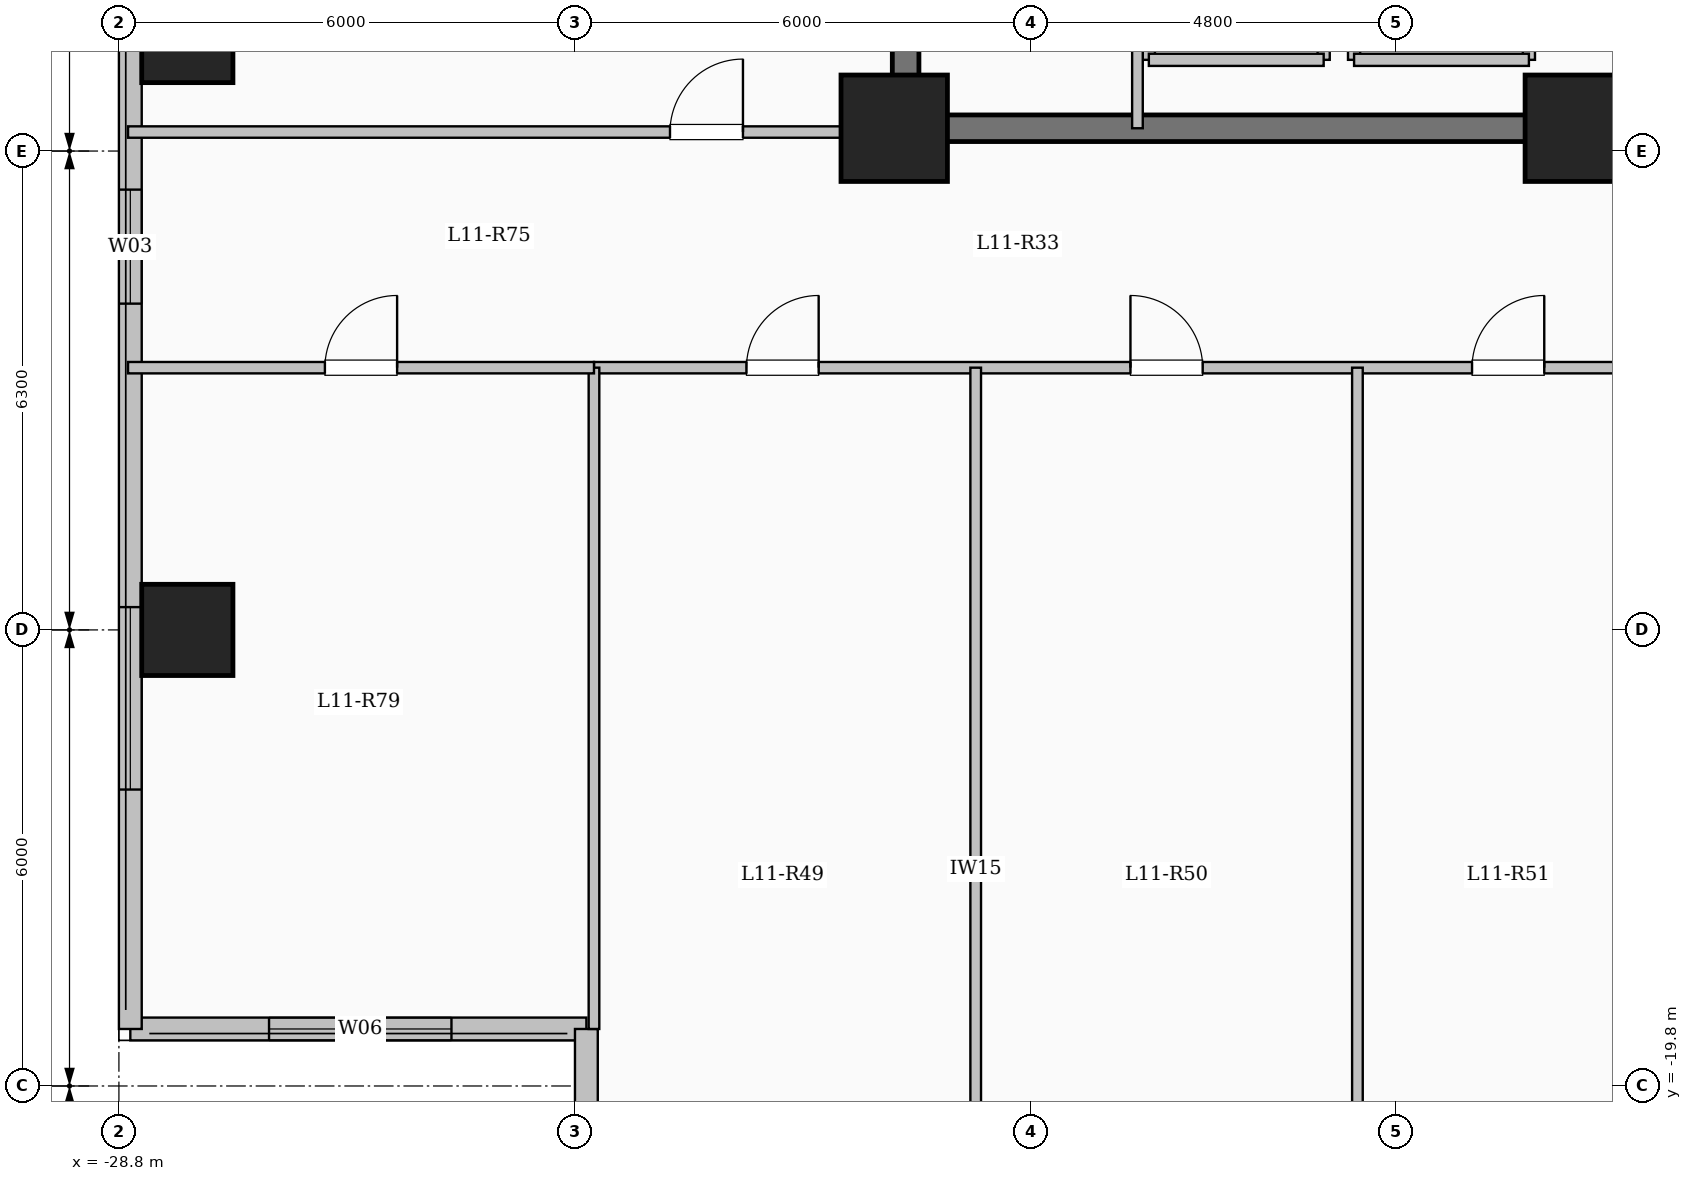
"""IFC4 building model, lengths in metres.
Left out: names, types, materials, properties, quantities, classifications, styles, units other than length and angle.
Written with IfcOpenShell. Run it as: python <this file> out.ifc"""

import sys

from ifc_helpers import new_model, si_unit, direction, frame, frame_2d, origin, origin_2d, place, context, subcontext, project, spatial, rectangle, extrude, element, fill, save


model = new_model("IFC4")
c1 = context("Model", 3, precision=1e-05, world=origin(), true_north=direction((0.0, 1.0)))
c2 = subcontext(c1, "Body", "Model", "MODEL_VIEW")
j1 = project(units=[si_unit("LENGTHUNIT", "METRE"), si_unit("PLANEANGLEUNIT", "RADIAN")], contexts=[c1])
p1 = place(None, origin())
s1 = spatial("IfcSite", under=j1, at=p1, CompositionType="ELEMENT")
p2 = place(p1, origin())
s2 = spatial("IfcBuilding", under=s1, at=p2, CompositionType="ELEMENT")
p3 = place(p2, frame((0.0, 0.0, 44.1)))
s3 = spatial("IfcBuildingStorey", under=s2, at=p3, CompositionType="ELEMENT", Elevation=44.1)
for number, where, z_axis, x_axis in (
    (1, (-9.6, -7.2, 0.0), (0.0, 0.0, 1.0), (1.0, 0.0, 0.0)),
    (2, (-18.6, -7.2, 0.0), (0.0, 0.0, 1.0), (1.0, 0.0, 0.0)),
):
    element("IfcColumn", number, at=place(p3, frame(where, z_axis=z_axis, x_axis=x_axis)), inside=s3, PredefinedType="COLUMN", context=c2, shape_type="SweptSolid", body=[
        extrude(rectangle(XDim=1.4, YDim=1.4, at=origin_2d()), origin(), (0.0, 0.0, 1.0), 3.35),
    ])
for number, where, z_axis, x_axis in (
    (3, (-27.9, -13.8, 0.0), (0.0, 0.0, 1.0), (1.0, 0.0, 0.0)),
    (4, (-27.9, -6.0, 0.0), (0.0, 0.0, 1.0), (1.0, 0.0, 0.0)),
):
    element("IfcColumn", number, at=place(p3, frame(where, z_axis=z_axis, x_axis=x_axis)), inside=s3, PredefinedType="COLUMN", context=c2, shape_type="SweptSolid", body=[
        extrude(rectangle(XDim=1.2, YDim=1.2, at=origin_2d()), origin(), (0.0, 0.0, 1.0), 3.35),
    ])
p4 = place(p3, frame((-22.65, -19.05, 0.0), z_axis=(0.0, 0.0, 1.0), x_axis=(-1.0, 0.0, 0.0)))
e5 = element("IfcWall", 5, at=p4, inside=s3, PredefinedType="SOLIDWALL", context=c2, shape_type="SweptSolid", body=[
    extrude(rectangle(XDim=6.0, YDim=0.3, at=frame_2d((3.0, 0.0))), origin(), (0.0, 0.0, 1.0), 3.1),
])
p5 = place(p4, frame((1.775, 0.0, 0.9)))
e6 = element("IfcOpeningElement", 6, at=p5, cuts=e5, PredefinedType="OPENING", context=c2, shape_type="SweptSolid", body=[
    extrude(rectangle(XDim=2.4, YDim=1.8, at=frame_2d((1.2, 0.9))), frame((0.0, 0.16, 0.0), z_axis=(0.0, -1.0, 0.0), x_axis=(1.0, 0.0, 0.0)), (0.0, 0.0, 1.0), 0.32),
])
p6 = place(p3, frame((-28.65, -19.05, 0.0), z_axis=(0.0, 0.0, 1.0), x_axis=(0.0, 1.0, 0.0)))
e7 = element("IfcWall", 7, at=p6, inside=s3, PredefinedType="SOLIDWALL", context=c2, shape_type="SweptSolid", body=[
    extrude(rectangle(XDim=38.1, YDim=0.3, at=frame_2d((19.05, 0.0))), origin(), (0.0, 0.0, 1.0), 3.1),
])
p7 = place(p6, frame((3.15, 0.0, 0.9)))
e8 = element("IfcOpeningElement", 8, at=p7, cuts=e7, PredefinedType="OPENING", context=c2, shape_type="SweptSolid", body=[
    extrude(rectangle(XDim=2.4, YDim=1.8, at=frame_2d((1.2, 0.9))), frame((0.0, 0.16, 0.0), z_axis=(0.0, -1.0, 0.0), x_axis=(1.0, 0.0, 0.0)), (0.0, 0.0, 1.0), 0.32),
])
p8 = place(p6, frame((9.542, 0.0, 0.9)))
e9 = element("IfcOpeningElement", 9, at=p8, cuts=e7, PredefinedType="OPENING", context=c2, shape_type="SweptSolid", body=[
    extrude(rectangle(XDim=1.5, YDim=1.65, at=frame_2d((0.75, 0.825))), frame((0.0, 0.16, 0.0), z_axis=(0.0, -1.0, 0.0), x_axis=(1.0, 0.0, 0.0)), (0.0, 0.0, 1.0), 0.32),
])
p9 = place(p6, frame((14.95, 0.0, 0.9)))
e10 = element("IfcOpeningElement", 10, at=p9, cuts=e7, PredefinedType="OPENING", context=c2, shape_type="SweptSolid", body=[
    extrude(rectangle(XDim=2.4, YDim=1.8, at=frame_2d((1.2, 0.9))), frame((0.0, 0.16, 0.0), z_axis=(0.0, -1.0, 0.0), x_axis=(1.0, 0.0, 0.0)), (0.0, 0.0, 1.0), 0.32),
])
p10 = place(p6, frame((21.375, 0.0, 0.9)))
e11 = element("IfcOpeningElement", 11, at=p10, cuts=e7, PredefinedType="OPENING", context=c2, shape_type="SweptSolid", body=[
    extrude(rectangle(XDim=1.8, YDim=1.65, at=frame_2d((0.9, 0.825))), frame((0.0, 0.16, 0.0), z_axis=(0.0, -1.0, 0.0), x_axis=(1.0, 0.0, 0.0)), (0.0, 0.0, 1.0), 0.32),
])
p11 = place(p6, frame((25.925, 0.0, 0.9)))
e12 = element("IfcOpeningElement", 12, at=p11, cuts=e7, PredefinedType="OPENING", context=c2, shape_type="SweptSolid", body=[
    extrude(rectangle(XDim=2.0, YDim=1.7, at=frame_2d((1.0, 0.85))), frame((0.0, 0.16, 0.0), z_axis=(0.0, -1.0, 0.0), x_axis=(1.0, 0.0, 0.0)), (0.0, 0.0, 1.0), 0.32),
])
p12 = place(p6, frame((30.175, 0.0, 0.95)))
e13 = element("IfcOpeningElement", 13, at=p12, cuts=e7, PredefinedType="OPENING", context=c2, shape_type="SweptSolid", body=[
    extrude(rectangle(XDim=1.0, YDim=1.5, at=frame_2d((0.5, 0.75))), frame((0.0, 0.16, 0.0), z_axis=(0.0, -1.0, 0.0), x_axis=(1.0, 0.0, 0.0)), (0.0, 0.0, 1.0), 0.32),
])
p13 = place(p6, frame((33.85, 0.0, 0.9)))
e14 = element("IfcOpeningElement", 14, at=p13, cuts=e7, PredefinedType="OPENING", context=c2, shape_type="SweptSolid", body=[
    extrude(rectangle(XDim=2.0, YDim=1.7, at=frame_2d((1.0, 0.85))), frame((0.0, 0.16, 0.0), z_axis=(0.0, -1.0, 0.0), x_axis=(1.0, 0.0, 0.0)), (0.0, 0.0, 1.0), 0.32),
])
p14 = place(p3, frame((-22.65, -23.55, 0.0), z_axis=(0.0, 0.0, 1.0), x_axis=(0.0, 1.0, 0.0)))
e15 = element("IfcWall", 15, at=p14, inside=s3, PredefinedType="SOLIDWALL", context=c2, shape_type="SweptSolid", body=[
    extrude(rectangle(XDim=4.5, YDim=0.3, at=frame_2d((2.25, 0.0))), origin(), (0.0, 0.0, 1.0), 3.1),
])
p15 = place(p14, frame((1.268, 0.0, 0.9)))
e16 = element("IfcOpeningElement", 16, at=p15, cuts=e15, PredefinedType="OPENING", context=c2, shape_type="SweptSolid", body=[
    extrude(rectangle(XDim=2.0, YDim=1.7, at=frame_2d((1.0, 0.85))), frame((0.0, 0.16, 0.0), z_axis=(0.0, -1.0, 0.0), x_axis=(1.0, 0.0, 0.0)), (0.0, 0.0, 1.0), 0.32),
])
p16 = place(p3, frame((-12.55, -6.3, 0.0), z_axis=(0.0, 0.0, 1.0), x_axis=(0.0, 1.0, 0.0)))
e17 = element("IfcWall", 17, at=p16, inside=s3, PredefinedType="SOLIDWALL", context=c2, shape_type="SweptSolid", body=[
    extrude(rectangle(XDim=2.6, YDim=0.16, at=frame_2d((1.3, 0.0))), origin(), (0.0, 0.0, 1.0), 3.1),
])
p17 = place(p3, frame((-10.25, -6.3, 0.0), z_axis=(0.0, 0.0, 1.0), x_axis=(0.0, 1.0, 0.0)))
e18 = element("IfcWall", 18, at=p17, inside=s3, PredefinedType="SOLIDWALL", context=c2, shape_type="SweptSolid", body=[
    extrude(rectangle(XDim=2.6, YDim=0.16, at=frame_2d((1.3, 0.0))), origin(), (0.0, 0.0, 1.0), 3.1),
])
p18 = place(p17, frame((0.75, 0.0, 0.0)))
e19 = element("IfcOpeningElement", 19, at=p18, cuts=e18, PredefinedType="OPENING", context=c2, shape_type="SweptSolid", body=[
    extrude(rectangle(XDim=1.1, YDim=2.15, at=frame_2d((0.55, 1.075))), frame((0.0, 0.09, 0.0), z_axis=(0.0, -1.0, 0.0), x_axis=(1.0, 0.0, 0.0)), (0.0, 0.0, 1.0), 0.18),
])
p19 = place(p3, frame((-12.55, -6.3, 0.0), z_axis=(0.0, 0.0, 1.0), x_axis=(1.0, 0.0, 0.0)))
e20 = element("IfcWall", 20, at=p19, inside=s3, PredefinedType="SOLIDWALL", context=c2, shape_type="SweptSolid", body=[
    extrude(rectangle(XDim=2.3, YDim=0.16, at=frame_2d((1.15, 0.0))), origin(), (0.0, 0.0, 1.0), 3.1),
])
for number, where, z_axis, x_axis in (
    (21, (-15.25, -6.3, 0.0), (0.0, 0.0, 1.0), (0.0, 1.0, 0.0)),
    (22, (-12.95, -6.3, 0.0), (0.0, 0.0, 1.0), (0.0, 1.0, 0.0)),
):
    element("IfcWall", number, at=place(p3, frame(where, z_axis=z_axis, x_axis=x_axis)), inside=s3, PredefinedType="SOLIDWALL", context=c2, shape_type="SweptSolid", body=[
        extrude(rectangle(XDim=2.6, YDim=0.16, at=frame_2d((1.3, 0.0))), origin(), (0.0, 0.0, 1.0), 3.1),
    ])
p20 = place(p3, frame((-15.25, -6.3, 0.0), z_axis=(0.0, 0.0, 1.0), x_axis=(1.0, 0.0, 0.0)))
e23 = element("IfcWall", 23, at=p20, inside=s3, PredefinedType="SOLIDWALL", context=c2, shape_type="SweptSolid", body=[
    extrude(rectangle(XDim=2.3, YDim=0.16, at=frame_2d((1.15, 0.0))), origin(), (0.0, 0.0, 1.0), 3.1),
])
p21 = place(p3, frame((-18.45, -7.375, 0.0), z_axis=(0.0, 0.0, 1.0), x_axis=(0.0, 1.0, 0.0)))
e24 = element("IfcWall", 24, at=p21, inside=s3, PredefinedType="SHEAR", context=c2, shape_type="SweptSolid", body=[
    extrude(rectangle(XDim=14.05, YDim=0.35, at=frame_2d((7.025, 0.0))), origin(), (0.0, 0.0, 1.0), 3.35),
])
p22 = place(p3, frame((-18.625, -7.2, 0.0), z_axis=(0.0, 0.0, 1.0), x_axis=(1.0, 0.0, 0.0)))
e25 = element("IfcWall", 25, at=p22, inside=s3, PredefinedType="SHEAR", context=c2, shape_type="SweptSolid", body=[
    extrude(rectangle(XDim=8.55, YDim=0.35, at=frame_2d((4.275, 0.0))), origin(), (0.0, 0.0, 1.0), 3.35),
])
p23 = place(p3, frame((-15.4, -7.2, 0.0), z_axis=(0.0, 0.0, 1.0), x_axis=(0.0, 1.0, 0.0)))
e26 = element("IfcWall", 26, at=p23, inside=s3, PredefinedType="PARTITIONING", context=c2, shape_type="SweptSolid", body=[
    extrude(rectangle(XDim=10.45, YDim=0.14, at=frame_2d((5.225, 0.0))), origin(), (0.0, 0.0, 1.0), 3.1),
])
p24 = place(p23, frame((9.25, 0.0, 0.0)))
e27 = element("IfcOpeningElement", 27, at=p24, cuts=e26, PredefinedType="OPENING", context=c2, shape_type="SweptSolid", body=[
    extrude(rectangle(XDim=0.9, YDim=2.08, at=frame_2d((0.45, 1.04))), frame((0.0, 0.08, 0.0), z_axis=(0.0, -1.0, 0.0), x_axis=(1.0, 0.0, 0.0)), (0.0, 0.0, 1.0), 0.16),
])
p25 = place(p3, frame((-22.55, -10.35, 0.0), z_axis=(0.0, 0.0, 1.0), x_axis=(1.0, 0.0, 0.0)))
e28 = element("IfcWall", 28, at=p25, inside=s3, PredefinedType="PARTITIONING", context=c2, shape_type="SweptSolid", body=[
    extrude(rectangle(XDim=14.0, YDim=0.15, at=frame_2d((7.0, 0.0))), origin(), (0.0, 0.0, 1.0), 3.1),
])
p26 = place(p25, frame((2.006, 0.0, 0.0)))
e29 = element("IfcOpeningElement", 29, at=p26, cuts=e28, PredefinedType="OPENING", context=c2, shape_type="SweptSolid", body=[
    extrude(rectangle(XDim=0.95, YDim=2.15, at=frame_2d((0.475, 1.075))), frame((0.0, 0.085, 0.0), z_axis=(0.0, -1.0, 0.0), x_axis=(1.0, 0.0, 0.0)), (0.0, 0.0, 1.0), 0.17),
])
p27 = place(p25, frame((7.058, 0.0, 0.0)))
e30 = element("IfcOpeningElement", 30, at=p27, cuts=e28, PredefinedType="OPENING", context=c2, shape_type="SweptSolid", body=[
    extrude(rectangle(XDim=0.95, YDim=2.15, at=frame_2d((0.475, 1.075))), frame((0.0, 0.085, 0.0), z_axis=(0.0, -1.0, 0.0), x_axis=(1.0, 0.0, 0.0)), (0.0, 0.0, 1.0), 0.17),
])
p28 = place(p25, frame((11.552, 0.0, 0.0)))
e31 = element("IfcOpeningElement", 31, at=p28, cuts=e28, PredefinedType="OPENING", context=c2, shape_type="SweptSolid", body=[
    extrude(rectangle(XDim=0.95, YDim=2.15, at=frame_2d((0.475, 1.075))), frame((0.0, 0.085, 0.0), z_axis=(0.0, -1.0, 0.0), x_axis=(1.0, 0.0, 0.0)), (0.0, 0.0, 1.0), 0.17),
])
for number, where, z_axis, x_axis in (
    (32, (-17.528, -23.55, 0.0), (0.0, 0.0, 1.0), (0.0, 1.0, 0.0)),
    (33, (-12.506, -23.55, 0.0), (0.0, 0.0, 1.0), (0.0, 1.0, 0.0)),
):
    element("IfcWall", number, at=place(p3, frame(where, z_axis=z_axis, x_axis=x_axis)), inside=s3, PredefinedType="PARTITIONING", context=c2, shape_type="SweptSolid", body=[
        extrude(rectangle(XDim=13.2, YDim=0.14, at=frame_2d((6.6, 0.0))), origin(), (0.0, 0.0, 1.0), 3.1),
    ])
p29 = place(p3, frame((-28.68, -7.25, 0.0), z_axis=(0.0, 0.0, 1.0), x_axis=(1.0, 0.0, 0.0)))
e34 = element("IfcWall", 34, at=p29, inside=s3, PredefinedType="PARTITIONING", context=c2, shape_type="SweptSolid", body=[
    extrude(rectangle(XDim=10.23, YDim=0.15, at=frame_2d((5.115, 0.0))), origin(), (0.0, 0.0, 1.0), 3.1),
])
p30 = place(p29, frame((7.13, 0.0, 0.0)))
e35 = element("IfcOpeningElement", 35, at=p30, cuts=e34, PredefinedType="OPENING", context=c2, shape_type="SweptSolid", body=[
    extrude(rectangle(XDim=0.96, YDim=2.15, at=frame_2d((0.48, 1.075))), frame((0.0, 0.085, 0.0), z_axis=(0.0, -1.0, 0.0), x_axis=(1.0, 0.0, 0.0)), (0.0, 0.0, 1.0), 0.17),
])
p31 = place(p3, frame((-22.55, -19.05, 0.0), z_axis=(0.0, 0.0, 1.0), x_axis=(0.0, 1.0, 0.0)))
e36 = element("IfcWall", 36, at=p31, inside=s3, PredefinedType="PARTITIONING", context=c2, shape_type="SweptSolid", body=[
    extrude(rectangle(XDim=8.7, YDim=0.14, at=frame_2d((4.35, 0.0))), origin(), (0.0, 0.0, 1.0), 3.1),
])
p32 = place(p3, frame((-28.68, -10.35, 0.0), z_axis=(0.0, 0.0, 1.0), x_axis=(1.0, 0.0, 0.0)))
e37 = element("IfcWall", 37, at=p32, inside=s3, PredefinedType="PARTITIONING", context=c2, shape_type="SweptSolid", body=[
    extrude(rectangle(XDim=6.13, YDim=0.15, at=frame_2d((3.065, 0.0))), origin(), (0.0, 0.0, 1.0), 3.1),
])
p33 = place(p32, frame((2.59, 0.0, 0.0)))
e38 = element("IfcOpeningElement", 38, at=p33, cuts=e37, PredefinedType="OPENING", context=c2, shape_type="SweptSolid", body=[
    extrude(rectangle(XDim=0.95, YDim=2.15, at=frame_2d((0.475, 1.075))), frame((0.0, 0.085, 0.0), z_axis=(0.0, -1.0, 0.0), x_axis=(1.0, 0.0, 0.0)), (0.0, 0.0, 1.0), 0.17),
])
p34 = place(p5, origin())
e39 = element("IfcWindow", 39, at=p34, inside=s3, PartitioningType="SINGLE_PANEL", PredefinedType="WINDOW", context=c2, shape_type="SweptSolid", body=[
    extrude(rectangle(XDim=2.4, YDim=1.8, at=frame_2d((1.2, 0.9))), frame((0.0, 0.03, 0.0), z_axis=(0.0, -1.0, 0.0), x_axis=(1.0, 0.0, 0.0)), (0.0, 0.0, 1.0), 0.06),
])
fill(e6, e39)
p35 = place(p7, origin())
e40 = element("IfcWindow", 40, at=p35, inside=s3, PartitioningType="SINGLE_PANEL", PredefinedType="WINDOW", context=c2, shape_type="SweptSolid", body=[
    extrude(rectangle(XDim=2.4, YDim=1.8, at=frame_2d((1.2, 0.9))), frame((0.0, 0.03, 0.0), z_axis=(0.0, -1.0, 0.0), x_axis=(1.0, 0.0, 0.0)), (0.0, 0.0, 1.0), 0.06),
])
fill(e8, e40)
p36 = place(p8, origin())
e41 = element("IfcWindow", 41, at=p36, inside=s3, PartitioningType="SINGLE_PANEL", PredefinedType="WINDOW", context=c2, shape_type="SweptSolid", body=[
    extrude(rectangle(XDim=1.5, YDim=1.65, at=frame_2d((0.75, 0.825))), frame((0.0, 0.03, 0.0), z_axis=(0.0, -1.0, 0.0), x_axis=(1.0, 0.0, 0.0)), (0.0, 0.0, 1.0), 0.06),
])
fill(e9, e41)
p37 = place(p26, origin())
e42 = element("IfcDoor", 42, at=p37, inside=s3, OperationType="SINGLE_SWING_RIGHT", PredefinedType="DOOR", context=c2, shape_type="SweptSolid", body=[
    extrude(rectangle(XDim=0.95, YDim=2.15, at=frame_2d((0.475, 1.075))), frame((0.0, 0.025, 0.0), z_axis=(0.0, -1.0, 0.0), x_axis=(1.0, 0.0, 0.0)), (0.0, 0.0, 1.0), 0.05),
])
fill(e29, e42)
p38 = place(p27, origin())
e43 = element("IfcDoor", 43, at=p38, inside=s3, OperationType="SINGLE_SWING_LEFT", PredefinedType="DOOR", context=c2, shape_type="SweptSolid", body=[
    extrude(rectangle(XDim=0.95, YDim=2.15, at=frame_2d((0.475, 1.075))), frame((0.0, 0.025, 0.0), z_axis=(0.0, -1.0, 0.0), x_axis=(1.0, 0.0, 0.0)), (0.0, 0.0, 1.0), 0.05),
])
fill(e30, e43)
p39 = place(p28, origin())
e44 = element("IfcDoor", 44, at=p39, inside=s3, OperationType="SINGLE_SWING_RIGHT", PredefinedType="DOOR", context=c2, shape_type="SweptSolid", body=[
    extrude(rectangle(XDim=0.95, YDim=2.15, at=frame_2d((0.475, 1.075))), frame((0.0, 0.025, 0.0), z_axis=(0.0, -1.0, 0.0), x_axis=(1.0, 0.0, 0.0)), (0.0, 0.0, 1.0), 0.05),
])
fill(e31, e44)
p40 = place(p33, origin())
e45 = element("IfcDoor", 45, at=p40, inside=s3, OperationType="SINGLE_SWING_RIGHT", PredefinedType="DOOR", context=c2, shape_type="SweptSolid", body=[
    extrude(rectangle(XDim=0.95, YDim=2.15, at=frame_2d((0.475, 1.075))), frame((0.0, 0.025, 0.0), z_axis=(0.0, -1.0, 0.0), x_axis=(1.0, 0.0, 0.0)), (0.0, 0.0, 1.0), 0.05),
])
fill(e38, e45)
p41 = place(p30, origin())
e46 = element("IfcDoor", 46, at=p41, inside=s3, OperationType="SINGLE_SWING_RIGHT", PredefinedType="DOOR", context=c2, shape_type="SweptSolid", body=[
    extrude(rectangle(XDim=0.96, YDim=2.15, at=frame_2d((0.48, 1.075))), frame((0.0, 0.025, 0.0), z_axis=(0.0, -1.0, 0.0), x_axis=(1.0, 0.0, 0.0)), (0.0, 0.0, 1.0), 0.05),
])
fill(e35, e46)
save(model, sys.argv[1])
